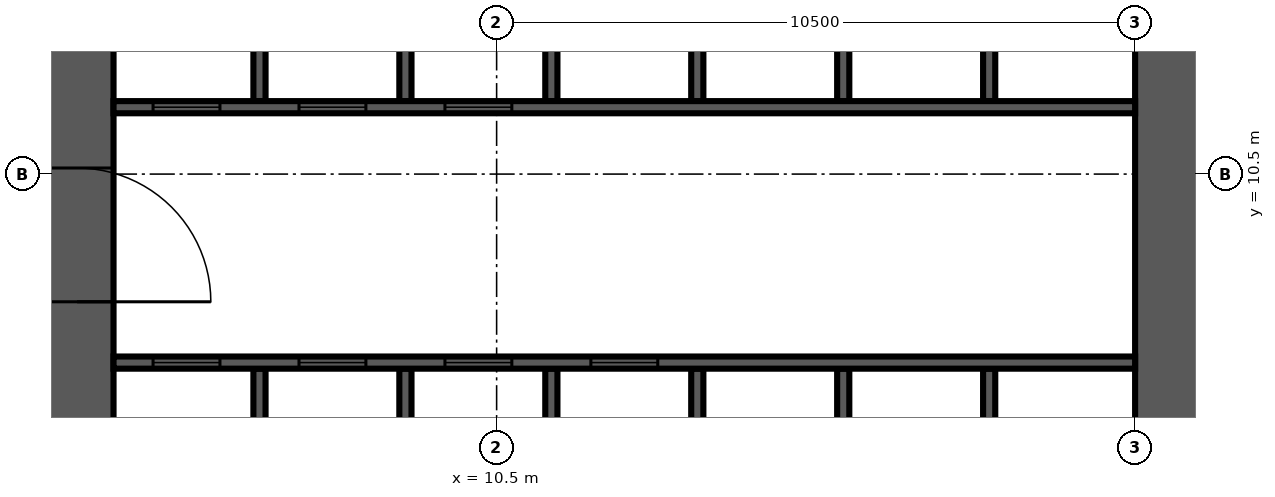
"""IFC4 building model, lengths in metres.
Left out: names, types, materials, properties, quantities, classifications, styles, units other than length and angle.
Written with IfcOpenShell. Run it as: python <this file> out.ifc"""

import sys

from ifc_helpers import new_model, si_unit, direction, frame, frame_2d, origin, place, context, subcontext, project, spatial, rectangle, extrude, source, transform, mapped, element, fill, save


model = new_model("IFC4")
c1 = context("Model", 3, precision=1e-05, world=origin(), true_north=direction((0.0, 1.0)))
c2 = subcontext(c1, "Body", "Model", "MODEL_VIEW")
j1 = project(units=[si_unit("LENGTHUNIT", "METRE"), si_unit("PLANEANGLEUNIT", "RADIAN")], contexts=[c1])
p1 = place(None, origin())
s1 = spatial("IfcSite", under=j1, at=p1, CompositionType="ELEMENT")
p2 = place(p1, origin())
s2 = spatial("IfcBuilding", under=s1, at=p2, CompositionType="ELEMENT")
p3 = place(p2, frame((0.0, 0.0, 53.1)))
s3 = spatial("IfcBuildingStorey", under=s2, at=p3, CompositionType="ELEMENT", Elevation=53.1)
m1 = source(origin(), c2, "Body", "SweptSolid", [
    extrude(rectangle(XDim=18.0, YDim=1.2, at=frame_2d((9.0, 0.0))), origin(), (0.0, 0.0, 1.0), 4.2),
])
p4 = place(p3, frame((3.6, 4.2, 0.0), z_axis=(0.0, 0.0, 1.0), x_axis=(0.0, 1.0, 0.0)))
e1 = element("IfcWall", 1, at=p4, inside=s3, PredefinedType="SHEAR", context=c2, shape_type="MappedRepresentation", body=[
    mapped(m1, transform((0.0, 0.0, 0.0), scale=1.0)),
])
m2 = source(origin(), c2, "Body", "SweptSolid", [
    extrude(rectangle(XDim=2.2, YDim=2.1, at=frame_2d((1.1, 1.05))), frame((0.0, 0.61, 0.0), z_axis=(0.0, -1.0, 0.0), x_axis=(1.0, 0.0, 0.0)), (0.0, 0.0, 1.0), 1.22),
])
p5 = place(p4, frame((4.2, 0.0, 0.0)))
e2 = element("IfcOpeningElement", 2, at=p5, cuts=e1, PredefinedType="OPENING", context=c2, shape_type="MappedRepresentation", body=[
    mapped(m2, transform((0.0, 0.0, 0.0), scale=1.0)),
])
m3 = source(origin(), c2, "Body", "SweptSolid", [
    extrude(rectangle(XDim=16.8, YDim=1.2, at=frame_2d((8.4, 0.0))), origin(), (0.0, 0.0, 1.0), 4.2),
])
p6 = place(p3, frame((21.6, 4.2, 0.0), z_axis=(0.0, 0.0, 1.0), x_axis=(0.0, 1.0, 0.0)))
e3 = element("IfcWall", 3, at=p6, inside=s3, PredefinedType="SHEAR", context=c2, shape_type="MappedRepresentation", body=[
    mapped(m3, transform((0.0, 0.0, 0.0), scale=1.0)),
])
m4 = source(origin(), c2, "Body", "SweptSolid", [
    extrude(rectangle(XDim=1.2, YDim=2.1, at=frame_2d((0.6, 1.05))), frame((0.0, 0.61, 0.0), z_axis=(0.0, -1.0, 0.0), x_axis=(1.0, 0.0, 0.0)), (0.0, 0.0, 1.0), 1.22),
])
p7 = place(p6, frame((14.7, 0.0, 0.0)))
e4 = element("IfcOpeningElement", 4, at=p7, cuts=e3, PredefinedType="OPENING", context=c2, shape_type="MappedRepresentation", body=[
    mapped(m4, transform((0.0, 0.0, 0.0), scale=1.0)),
])
m5 = source(origin(), c2, "Body", "SweptSolid", [
    extrude(rectangle(XDim=3.1, YDim=0.2, at=frame_2d((1.55, 0.0))), origin(), (0.0, 0.0, 1.0), 4.2),
])
for number, where, z_axis, x_axis in (
    (5, (6.6, 4.2, 0.0), (0.0, 0.0, 1.0), (0.0, 1.0, 0.0)),
    (6, (9.0, 4.2, 0.0), (0.0, 0.0, 1.0), (0.0, 1.0, 0.0)),
    (7, (11.4, 4.2, 0.0), (0.0, 0.0, 1.0), (0.0, 1.0, 0.0)),
    (8, (13.8, 4.2, 0.0), (0.0, 0.0, 1.0), (0.0, 1.0, 0.0)),
    (9, (16.2, 4.2, 0.0), (0.0, 0.0, 1.0), (0.0, 1.0, 0.0)),
    (10, (18.6, 4.2, 0.0), (0.0, 0.0, 1.0), (0.0, 1.0, 0.0)),
):
    element("IfcWall", number, at=place(p3, frame(where, z_axis=z_axis, x_axis=x_axis)), inside=s3, PredefinedType="SOLIDWALL", context=c2, shape_type="MappedRepresentation", body=[
        mapped(m5, transform((0.0, 0.0, 0.0), scale=1.0)),
    ])
m6 = source(origin(), c2, "Body", "SweptSolid", [
    extrude(rectangle(XDim=3.0, YDim=0.2, at=frame_2d((1.5, 0.0))), origin(), (0.0, 0.0, 1.0), 4.2),
])
for number, where, z_axis, x_axis in (
    (11, (6.6, 11.7, 0.0), (0.0, 0.0, 1.0), (0.0, 1.0, 0.0)),
    (12, (9.0, 11.7, 0.0), (0.0, 0.0, 1.0), (0.0, 1.0, 0.0)),
    (13, (11.4, 11.7, 0.0), (0.0, 0.0, 1.0), (0.0, 1.0, 0.0)),
    (14, (13.8, 11.7, 0.0), (0.0, 0.0, 1.0), (0.0, 1.0, 0.0)),
    (15, (16.2, 11.7, 0.0), (0.0, 0.0, 1.0), (0.0, 1.0, 0.0)),
    (16, (18.6, 11.7, 0.0), (0.0, 0.0, 1.0), (0.0, 1.0, 0.0)),
):
    element("IfcWall", number, at=place(p3, frame(where, z_axis=z_axis, x_axis=x_axis)), inside=s3, PredefinedType="SOLIDWALL", context=c2, shape_type="MappedRepresentation", body=[
        mapped(m6, transform((0.0, 0.0, 0.0), scale=1.0)),
    ])
m7 = source(origin(), c2, "Body", "SweptSolid", [
    extrude(rectangle(XDim=16.8, YDim=0.2, at=frame_2d((8.4, 0.0))), origin(), (0.0, 0.0, 1.0), 4.2),
])
p8 = place(p3, frame((4.2, 7.4, 0.0), z_axis=(0.0, 0.0, 1.0), x_axis=(1.0, 0.0, 0.0)))
e17 = element("IfcWall", 17, at=p8, inside=s3, PredefinedType="SOLIDWALL", context=c2, shape_type="MappedRepresentation", body=[
    mapped(m7, transform((0.0, 0.0, 0.0), scale=1.0)),
])
m8 = source(origin(), c2, "Body", "SweptSolid", [
    extrude(rectangle(XDim=1.1, YDim=2.1, at=frame_2d((0.55, 1.05))), frame((0.0, 0.11, 0.0), z_axis=(0.0, -1.0, 0.0), x_axis=(1.0, 0.0, 0.0)), (0.0, 0.0, 1.0), 0.22),
])
p9 = place(p8, frame((0.65, 0.0, 0.0)))
e18 = element("IfcOpeningElement", 18, at=p9, cuts=e17, PredefinedType="OPENING", context=c2, shape_type="MappedRepresentation", body=[
    mapped(m8, transform((0.0, 0.0, 0.0), scale=1.0)),
])
p10 = place(p8, frame((3.05, 0.0, 0.0)))
e19 = element("IfcOpeningElement", 19, at=p10, cuts=e17, PredefinedType="OPENING", context=c2, shape_type="MappedRepresentation", body=[
    mapped(m8, transform((0.0, 0.0, 0.0), scale=1.0)),
])
p11 = place(p8, frame((5.45, 0.0, 0.0)))
e20 = element("IfcOpeningElement", 20, at=p11, cuts=e17, PredefinedType="OPENING", context=c2, shape_type="MappedRepresentation", body=[
    mapped(m8, transform((0.0, 0.0, 0.0), scale=1.0)),
])
p12 = place(p8, frame((7.85, 0.0, 0.0)))
e21 = element("IfcOpeningElement", 21, at=p12, cuts=e17, PredefinedType="OPENING", context=c2, shape_type="MappedRepresentation", body=[
    mapped(m8, transform((0.0, 0.0, 0.0), scale=1.0)),
])
p13 = place(p3, frame((4.2, 11.6, 0.0), z_axis=(0.0, 0.0, 1.0), x_axis=(1.0, 0.0, 0.0)))
e22 = element("IfcWall", 22, at=p13, inside=s3, PredefinedType="SOLIDWALL", context=c2, shape_type="MappedRepresentation", body=[
    mapped(m7, transform((0.0, 0.0, 0.0), scale=1.0)),
])
p14 = place(p13, frame((0.65, 0.0, 0.0)))
e23 = element("IfcOpeningElement", 23, at=p14, cuts=e22, PredefinedType="OPENING", context=c2, shape_type="MappedRepresentation", body=[
    mapped(m8, transform((0.0, 0.0, 0.0), scale=1.0)),
])
p15 = place(p13, frame((3.05, 0.0, 0.0)))
e24 = element("IfcOpeningElement", 24, at=p15, cuts=e22, PredefinedType="OPENING", context=c2, shape_type="MappedRepresentation", body=[
    mapped(m8, transform((0.0, 0.0, 0.0), scale=1.0)),
])
p16 = place(p13, frame((5.45, 0.0, 0.0)))
e25 = element("IfcOpeningElement", 25, at=p16, cuts=e22, PredefinedType="OPENING", context=c2, shape_type="MappedRepresentation", body=[
    mapped(m8, transform((0.0, 0.0, 0.0), scale=1.0)),
])
m9 = source(origin(), c2, "Body", "SweptSolid", [
    extrude(rectangle(XDim=1.1, YDim=2.1, at=frame_2d((0.55, 1.05))), frame((0.0, 0.025, 0.0), z_axis=(0.0, -1.0, 0.0), x_axis=(1.0, 0.0, 0.0)), (0.0, 0.0, 1.0), 0.05),
])
p17 = place(p9, origin())
e26 = element("IfcDoor", 26, at=p17, inside=s3, OperationType="SLIDING_TO_LEFT", PredefinedType="DOOR", context=c2, shape_type="MappedRepresentation", body=[
    mapped(m9, transform((0.0, 0.0, 0.0), scale=1.0)),
])
fill(e18, e26)
p18 = place(p10, origin())
e27 = element("IfcDoor", 27, at=p18, inside=s3, OperationType="SLIDING_TO_LEFT", PredefinedType="DOOR", context=c2, shape_type="MappedRepresentation", body=[
    mapped(m9, transform((0.0, 0.0, 0.0), scale=1.0)),
])
fill(e19, e27)
p19 = place(p11, origin())
e28 = element("IfcDoor", 28, at=p19, inside=s3, OperationType="SLIDING_TO_LEFT", PredefinedType="DOOR", context=c2, shape_type="MappedRepresentation", body=[
    mapped(m9, transform((0.0, 0.0, 0.0), scale=1.0)),
])
fill(e20, e28)
p20 = place(p12, origin())
e29 = element("IfcDoor", 29, at=p20, inside=s3, OperationType="SLIDING_TO_LEFT", PredefinedType="DOOR", context=c2, shape_type="MappedRepresentation", body=[
    mapped(m9, transform((0.0, 0.0, 0.0), scale=1.0)),
])
fill(e21, e29)
p21 = place(p14, origin())
e30 = element("IfcDoor", 30, at=p21, inside=s3, OperationType="SLIDING_TO_LEFT", PredefinedType="DOOR", context=c2, shape_type="MappedRepresentation", body=[
    mapped(m9, transform((0.0, 0.0, 0.0), scale=1.0)),
])
fill(e23, e30)
p22 = place(p15, origin())
e31 = element("IfcDoor", 31, at=p22, inside=s3, OperationType="SLIDING_TO_LEFT", PredefinedType="DOOR", context=c2, shape_type="MappedRepresentation", body=[
    mapped(m9, transform((0.0, 0.0, 0.0), scale=1.0)),
])
fill(e24, e31)
p23 = place(p16, origin())
e32 = element("IfcDoor", 32, at=p23, inside=s3, OperationType="SLIDING_TO_LEFT", PredefinedType="DOOR", context=c2, shape_type="MappedRepresentation", body=[
    mapped(m9, transform((0.0, 0.0, 0.0), scale=1.0)),
])
fill(e25, e32)
m10 = source(origin(), c2, "Body", "SweptSolid", [
    extrude(rectangle(XDim=2.2, YDim=2.1, at=frame_2d((1.1, 1.05))), frame((0.0, 0.025, 0.0), z_axis=(0.0, -1.0, 0.0), x_axis=(1.0, 0.0, 0.0)), (0.0, 0.0, 1.0), 0.05),
])
p24 = place(p5, origin())
e33 = element("IfcDoor", 33, at=p24, inside=s3, OperationType="DOUBLE_DOOR_SINGLE_SWING", PredefinedType="DOOR", context=c2, shape_type="MappedRepresentation", body=[
    mapped(m10, transform((0.0, 0.0, 0.0), scale=1.0)),
])
fill(e2, e33)
save(model, sys.argv[1])
